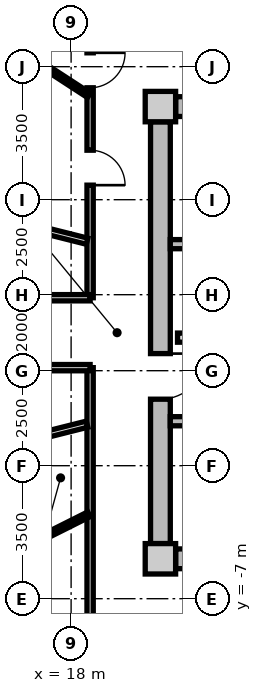
"""IFC4 building model, lengths in metres.
Left out: names, types, materials, properties, quantities, classifications, styles, units other than length and angle.
Written with IfcOpenShell. Run it as: python <this file> out.ifc"""

import sys

from ifc_helpers import new_model, si_unit, direction, frame, frame_2d, origin, origin_2d, place, context, subcontext, project, spatial, rectangle, extrude, source, transform, mapped, element, fill, save


model = new_model("IFC4")
c1 = context("Model", 3, precision=1e-05, world=origin(), true_north=direction((0.0, 1.0)))
c2 = subcontext(c1, "Body", "Model", "MODEL_VIEW")
j1 = project(units=[si_unit("LENGTHUNIT", "METRE"), si_unit("PLANEANGLEUNIT", "RADIAN")], contexts=[c1])
p1 = place(None, origin())
s1 = spatial("IfcSite", under=j1, at=p1, CompositionType="ELEMENT")
p2 = place(p1, origin())
s2 = spatial("IfcBuilding", under=s1, at=p2, CompositionType="ELEMENT")
p3 = place(p2, frame((0.0, 0.0, 203.8)))
s3 = spatial("IfcBuildingStorey", under=s2, at=p3, CompositionType="ELEMENT", Elevation=203.8)
m1 = source(origin(), c2, "Body", "SweptSolid", [
    extrude(rectangle(XDim=0.8, YDim=0.8, at=origin_2d()), origin(), (0.0, 0.0, 1.0), 4.0),
])
for number, where, z_axis, x_axis in (
    (1, (20.35, -5.95, 0.0), (0.0, 0.0, 1.0), (1.0, 0.0, 0.0)),
    (2, (20.35, 5.95, 0.0), (0.0, 0.0, 1.0), (1.0, 0.0, 0.0)),
):
    element("IfcColumn", number, at=place(p3, frame(where, z_axis=z_axis, x_axis=x_axis)), inside=s3, PredefinedType="COLUMN", context=c2, shape_type="MappedRepresentation", body=[
        mapped(m1, transform((0.0, 0.0, 0.0), x_axis=(1.0, 0.0, 0.0), y_axis=(0.0, 1.0, 0.0), z_axis=(0.0, 0.0, 1.0), scale=1.0)),
    ])
m2 = source(origin(), c2, "Body", "SweptSolid", [
    extrude(rectangle(XDim=14.5, YDim=0.52, at=frame_2d((7.25, 0.0))), origin(), (0.0, 0.0, 1.0), 3.71),
])
for number, where, z_axis, x_axis in (
    (3, (20.75, 5.95, 0.0), (0.0, 0.0, 1.0), (1.0, 0.0, 0.0)),
    (4, (35.25, -5.95, 0.0), (0.0, 0.0, 1.0), (-1.0, 0.0, 0.0)),
):
    element("IfcWall", number, at=place(p3, frame(where, z_axis=z_axis, x_axis=x_axis)), inside=s3, PredefinedType="SHEAR", context=c2, shape_type="MappedRepresentation", body=[
        mapped(m2, transform((0.0, 0.0, 0.0), x_axis=(1.0, 0.0, 0.0), y_axis=(0.0, 1.0, 0.0), z_axis=(0.0, 0.0, 1.0), scale=1.0)),
    ])
m3 = source(origin(), c2, "Body", "SweptSolid", [
    extrude(rectangle(XDim=11.1, YDim=0.52, at=frame_2d((5.55, 0.0))), origin(), (0.0, 0.0, 1.0), 3.71),
])
p4 = place(p3, frame((20.35, -5.55, 0.0), z_axis=(0.0, 0.0, 1.0), x_axis=(0.0, 1.0, 0.0)))
e5 = element("IfcWall", 5, at=p4, inside=s3, PredefinedType="SHEAR", context=c2, shape_type="MappedRepresentation", body=[
    mapped(m3, transform((0.0, 0.0, 0.0), x_axis=(1.0, 0.0, 0.0), y_axis=(0.0, 1.0, 0.0), z_axis=(0.0, 0.0, 1.0), scale=1.0)),
])
p5 = place(p4, frame((3.8, 0.0, 0.0)))
e6 = element("IfcOpeningElement", 6, at=p5, cuts=e5, PredefinedType="OPENING", context=c2, shape_type="SweptSolid", body=[
    extrude(rectangle(XDim=1.2, YDim=2.15, at=frame_2d((0.6, 1.075))), frame((0.0, 0.27, 0.0), z_axis=(0.0, -1.0, 0.0), x_axis=(1.0, 0.0, 0.0)), (0.0, 0.0, 1.0), 0.54),
])
m4 = source(origin(), c2, "Body", "SweptSolid", [
    extrude(rectangle(XDim=7.93, YDim=0.24, at=frame_2d((3.965, 0.0))), origin(), (0.0, 0.0, 1.0), 3.71),
])
p6 = place(p3, frame((20.61, 2.33, 0.0), z_axis=(0.0, 0.0, 1.0), x_axis=(1.0, 0.0, 0.0)))
e7 = element("IfcWall", 7, at=p6, inside=s3, PredefinedType="PARTITIONING", context=c2, shape_type="MappedRepresentation", body=[
    mapped(m4, transform((0.0, 0.0, 0.0), x_axis=(1.0, 0.0, 0.0), y_axis=(0.0, 1.0, 0.0), z_axis=(0.0, 0.0, 1.0), scale=1.0)),
])
p7 = place(p3, frame((20.61, -2.33, 0.0), z_axis=(0.0, 0.0, 1.0), x_axis=(1.0, 0.0, 0.0)))
e8 = element("IfcWall", 8, at=p7, inside=s3, PredefinedType="PARTITIONING", context=c2, shape_type="MappedRepresentation", body=[
    mapped(m4, transform((0.0, 0.0, 0.0), x_axis=(1.0, 0.0, 0.0), y_axis=(0.0, 1.0, 0.0), z_axis=(0.0, 0.0, 1.0), scale=1.0)),
])
p8 = place(p7, frame((1.05, 0.0, 0.0)))
e9 = element("IfcOpeningElement", 9, at=p8, cuts=e8, PredefinedType="OPENING", context=c2, shape_type="SweptSolid", body=[
    extrude(rectangle(XDim=1.1, YDim=2.15, at=frame_2d((0.55, 1.075))), frame((0.0, 0.13, 0.0), z_axis=(0.0, -1.0, 0.0), x_axis=(1.0, 0.0, 0.0)), (0.0, 0.0, 1.0), 0.26),
])
m5 = source(origin(), c2, "Body", "SweptSolid", [
    extrude(rectangle(XDim=7.62, YDim=0.24, at=frame_2d((3.81, 0.0))), origin(), (0.0, 0.0, 1.0), 3.695),
])
p9 = place(p3, frame((20.8, -0.13, 0.0), z_axis=(0.0, 0.0, 1.0), x_axis=(1.0, 0.0, 0.0)))
e10 = element("IfcWall", 10, at=p9, inside=s3, PredefinedType="PARTITIONING", context=c2, shape_type="MappedRepresentation", body=[
    mapped(m5, transform((0.0, 0.0, 0.0), x_axis=(1.0, 0.0, 0.0), y_axis=(0.0, 1.0, 0.0), z_axis=(0.0, 0.0, 1.0), scale=1.0)),
])
p10 = place(p9, frame((6.22, 0.0, 0.0)))
e11 = element("IfcOpeningElement", 11, at=p10, cuts=e10, PredefinedType="OPENING", context=c2, shape_type="SweptSolid", body=[
    extrude(rectangle(XDim=1.0, YDim=2.1, at=frame_2d((0.5, 1.05))), frame((0.0, 0.13, 0.0), z_axis=(0.0, -1.0, 0.0), x_axis=(1.0, 0.0, 0.0)), (0.0, 0.0, 1.0), 0.26),
])
p11 = place(p9, frame((2.4, 0.0, 0.0)))
e12 = element("IfcOpeningElement", 12, at=p11, cuts=e10, PredefinedType="OPENING", context=c2, shape_type="SweptSolid", body=[
    extrude(rectangle(XDim=1.0, YDim=2.1, at=frame_2d((0.5, 1.05))), frame((0.0, 0.13, 0.0), z_axis=(0.0, -1.0, 0.0), x_axis=(1.0, 0.0, 0.0)), (0.0, 0.0, 1.0), 0.26),
])
m6 = source(origin(), c2, "Body", "SweptSolid", [
    extrude(rectangle(XDim=6.88, YDim=0.165, at=frame_2d((3.44, 0.0))), origin(), (0.0, 0.0, 1.0), 3.695),
])
p12 = place(p3, frame((18.5, -7.8, 0.0), z_axis=(0.0, 0.0, 1.0), x_axis=(0.0, 1.0, 0.0)))
e13 = element("IfcWall", 13, at=p12, inside=s3, PredefinedType="PARTITIONING", context=c2, shape_type="MappedRepresentation", body=[
    mapped(m6, transform((0.0, 0.0, 0.0), x_axis=(1.0, 0.0, 0.0), y_axis=(0.0, 1.0, 0.0), z_axis=(0.0, 0.0, 1.0), scale=1.0)),
])
p13 = place(p3, frame((18.5, 0.92, 0.0), z_axis=(0.0, 0.0, 1.0), x_axis=(0.0, 1.0, 0.0)))
e14 = element("IfcWall", 14, at=p13, inside=s3, PredefinedType="PARTITIONING", context=c2, shape_type="MappedRepresentation", body=[
    mapped(m6, transform((0.0, 0.0, 0.0), x_axis=(1.0, 0.0, 0.0), y_axis=(0.0, 1.0, 0.0), z_axis=(0.0, 0.0, 1.0), scale=1.0)),
])
p14 = place(p13, frame((5.525, 0.0, 0.0)))
e15 = element("IfcOpeningElement", 15, at=p14, cuts=e14, PredefinedType="OPENING", context=c2, shape_type="SweptSolid", body=[
    extrude(rectangle(XDim=0.92, YDim=2.1, at=frame_2d((0.46, 1.05))), frame((0.0, 0.093, 0.0), z_axis=(0.0, -1.0, 0.0), x_axis=(1.0, 0.0, 0.0)), (0.0, 0.0, 1.0), 0.185),
])
p15 = place(p13, frame((2.962, 0.0, 0.0)))
e16 = element("IfcOpeningElement", 16, at=p15, cuts=e14, PredefinedType="OPENING", context=c2, shape_type="SweptSolid", body=[
    extrude(rectangle(XDim=0.92, YDim=2.1, at=frame_2d((0.46, 1.05))), frame((0.0, 0.093, 0.0), z_axis=(0.0, -1.0, 0.0), x_axis=(1.0, 0.0, 0.0)), (0.0, 0.0, 1.0), 0.185),
])
m7 = source(origin(), c2, "Body", "SweptSolid", [
    extrude(rectangle(XDim=6.157, YDim=0.165, at=frame_2d((3.079, 0.0))), origin(), (0.0, 0.0, 1.0), 3.295),
])
for number, where, z_axis, x_axis in (
    (17, (18.42, 2.407, 0.0), (0.0, 0.0, 1.0), (-0.97, 0.244, 0.0)),
    (18, (18.42, -2.407, 0.0), (0.0, 0.0, 1.0), (-0.97, -0.244, 0.0)),
):
    element("IfcWall", number, at=place(p3, frame(where, z_axis=z_axis, x_axis=x_axis)), inside=s3, PredefinedType="PARTITIONING", context=c2, shape_type="MappedRepresentation", body=[
        mapped(m7, transform((0.0, 0.0, 0.0), x_axis=(1.0, 0.0, 0.0), y_axis=(0.0, 1.0, 0.0), z_axis=(0.0, 0.0, 1.0), scale=1.0)),
    ])
m8 = source(origin(), c2, "Body", "SweptSolid", [
    extrude(rectangle(XDim=3.904, YDim=0.14, at=frame_2d((1.952, 0.0))), origin(), (0.0, 0.0, 1.0), 3.695),
])
p16 = place(p3, frame((18.47, 6.246, 0.0), z_axis=(0.0, 0.0, 1.0), x_axis=(-0.838024687996, 0.545632314209, 0.0)))
e19 = element("IfcWall", 19, at=p16, inside=s3, PredefinedType="PARTITIONING", context=c2, shape_type="MappedRepresentation", body=[
    mapped(m8, transform((0.0, 0.0, 0.0), x_axis=(1.0, 0.0, 0.0), y_axis=(0.0, 1.0, 0.0), z_axis=(0.0, 0.0, 1.0), scale=1.0)),
])
m9 = source(origin(), c2, "Body", "SweptSolid", [
    extrude(rectangle(XDim=1.638, YDim=0.14, at=frame_2d((0.819, 0.0))), origin(), (0.0, 0.0, 1.0), 3.695),
])
p17 = place(p3, frame((18.47, -4.778, 0.0), z_axis=(0.0, 0.0, 1.0), x_axis=(-0.893919977945, -0.448226586707, 0.0)))
e20 = element("IfcWall", 20, at=p17, inside=s3, PredefinedType="PARTITIONING", context=c2, shape_type="MappedRepresentation", body=[
    mapped(m9, transform((0.0, 0.0, 0.0), x_axis=(1.0, 0.0, 0.0), y_axis=(0.0, 1.0, 0.0), z_axis=(0.0, 0.0, 1.0), scale=1.0)),
])
m10 = source(origin(), c2, "Body", "SweptSolid", [
    extrude(rectangle(XDim=3.45, YDim=0.115, at=frame_2d((1.725, 0.0))), origin(), (0.0, 0.0, 1.0), 3.695),
])
p18 = place(p3, frame((16.475, -6.275, 0.0), z_axis=(0.0, 0.0, 1.0), x_axis=(0.483659007882, -0.875256513312, 0.0)))
e21 = element("IfcWall", 21, at=p18, inside=s3, PredefinedType="PARTITIONING", context=c2, shape_type="MappedRepresentation", body=[
    mapped(m10, transform((0.0, 0.0, 0.0), x_axis=(1.0, 0.0, 0.0), y_axis=(0.0, 1.0, 0.0), z_axis=(0.0, 0.0, 1.0), scale=1.0)),
])
p19 = place(p18, frame((1.25, 0.0, 0.0)))
e22 = element("IfcOpeningElement", 22, at=p19, cuts=e21, PredefinedType="OPENING", context=c2, shape_type="SweptSolid", body=[
    extrude(rectangle(XDim=0.95, YDim=2.1, at=frame_2d((0.475, 1.05))), frame((0.0, 0.067, 0.0), z_axis=(0.0, -1.0, 0.0), x_axis=(1.0, 0.0, 0.0)), (0.0, 0.0, 1.0), 0.135),
])
m11 = source(origin(), c2, "Body", "SweptSolid", [
    extrude(rectangle(XDim=37.0, YDim=0.165, at=frame_2d((18.5, 0.0))), origin(), (0.0, 0.0, 1.0), 3.695),
])
p20 = place(p3, frame((-18.5, -0.92, 0.0), z_axis=(0.0, 0.0, 1.0), x_axis=(1.0, 0.0, 0.0)))
e23 = element("IfcWall", 23, at=p20, inside=s3, PredefinedType="PARTITIONING", context=c2, shape_type="MappedRepresentation", body=[
    mapped(m11, transform((0.0, 0.0, 0.0), x_axis=(1.0, 0.0, 0.0), y_axis=(0.0, 1.0, 0.0), z_axis=(0.0, 0.0, 1.0), scale=1.0)),
])
p21 = place(p20, frame((2.662, 0.0, 0.0)))
e24 = element("IfcOpeningElement", 24, at=p21, cuts=e23, PredefinedType="OPENING", context=c2, shape_type="SweptSolid", body=[
    extrude(rectangle(XDim=0.95, YDim=2.1, at=frame_2d((0.475, 1.05))), frame((0.0, 0.093, 0.0), z_axis=(0.0, -1.0, 0.0), x_axis=(1.0, 0.0, 0.0)), (0.0, 0.0, 1.0), 0.185),
])
p22 = place(p20, frame((33.388, 0.0, 0.0)))
e25 = element("IfcOpeningElement", 25, at=p22, cuts=e23, PredefinedType="OPENING", context=c2, shape_type="SweptSolid", body=[
    extrude(rectangle(XDim=0.95, YDim=2.1, at=frame_2d((0.475, 1.05))), frame((0.0, 0.093, 0.0), z_axis=(0.0, -1.0, 0.0), x_axis=(1.0, 0.0, 0.0)), (0.0, 0.0, 1.0), 0.185),
])
p23 = place(p20, frame((9.075, 0.0, 0.0)))
e26 = element("IfcOpeningElement", 26, at=p23, cuts=e23, PredefinedType="OPENING", context=c2, shape_type="SweptSolid", body=[
    extrude(rectangle(XDim=1.25, YDim=2.2, at=frame_2d((0.625, 1.1))), frame((0.0, 0.093, 0.0), z_axis=(0.0, -1.0, 0.0), x_axis=(1.0, 0.0, 0.0)), (0.0, 0.0, 1.0), 0.185),
])
p24 = place(p20, frame((17.875, 0.0, 0.0)))
e27 = element("IfcOpeningElement", 27, at=p24, cuts=e23, PredefinedType="OPENING", context=c2, shape_type="SweptSolid", body=[
    extrude(rectangle(XDim=1.25, YDim=2.2, at=frame_2d((0.625, 1.1))), frame((0.0, 0.093, 0.0), z_axis=(0.0, -1.0, 0.0), x_axis=(1.0, 0.0, 0.0)), (0.0, 0.0, 1.0), 0.185),
])
p25 = place(p20, frame((26.675, 0.0, 0.0)))
e28 = element("IfcOpeningElement", 28, at=p25, cuts=e23, PredefinedType="OPENING", context=c2, shape_type="SweptSolid", body=[
    extrude(rectangle(XDim=1.25, YDim=2.2, at=frame_2d((0.625, 1.1))), frame((0.0, 0.093, 0.0), z_axis=(0.0, -1.0, 0.0), x_axis=(1.0, 0.0, 0.0)), (0.0, 0.0, 1.0), 0.185),
])
p26 = place(p3, frame((-18.5, 0.92, 0.0), z_axis=(0.0, 0.0, 1.0), x_axis=(1.0, 0.0, 0.0)))
e29 = element("IfcWall", 29, at=p26, inside=s3, PredefinedType="PARTITIONING", context=c2, shape_type="MappedRepresentation", body=[
    mapped(m11, transform((0.0, 0.0, 0.0), x_axis=(1.0, 0.0, 0.0), y_axis=(0.0, 1.0, 0.0), z_axis=(0.0, 0.0, 1.0), scale=1.0)),
])
p27 = place(p26, frame((2.662, 0.0, 0.0)))
e30 = element("IfcOpeningElement", 30, at=p27, cuts=e29, PredefinedType="OPENING", context=c2, shape_type="SweptSolid", body=[
    extrude(rectangle(XDim=0.95, YDim=2.1, at=frame_2d((0.475, 1.05))), frame((0.0, 0.093, 0.0), z_axis=(0.0, -1.0, 0.0), x_axis=(1.0, 0.0, 0.0)), (0.0, 0.0, 1.0), 0.185),
])
p28 = place(p26, frame((33.388, 0.0, 0.0)))
e31 = element("IfcOpeningElement", 31, at=p28, cuts=e29, PredefinedType="OPENING", context=c2, shape_type="SweptSolid", body=[
    extrude(rectangle(XDim=0.95, YDim=2.1, at=frame_2d((0.475, 1.05))), frame((0.0, 0.093, 0.0), z_axis=(0.0, -1.0, 0.0), x_axis=(1.0, 0.0, 0.0)), (0.0, 0.0, 1.0), 0.185),
])
p29 = place(p26, frame((7.64, 0.0, 0.0)))
e32 = element("IfcOpeningElement", 32, at=p29, cuts=e29, PredefinedType="OPENING", context=c2, shape_type="SweptSolid", body=[
    extrude(rectangle(XDim=0.92, YDim=2.1, at=frame_2d((0.46, 1.05))), frame((0.0, 0.093, 0.0), z_axis=(0.0, -1.0, 0.0), x_axis=(1.0, 0.0, 0.0)), (0.0, 0.0, 1.0), 0.185),
])
p30 = place(p26, frame((10.275, 0.0, 0.0)))
e33 = element("IfcOpeningElement", 33, at=p30, cuts=e29, PredefinedType="OPENING", context=c2, shape_type="SweptSolid", body=[
    extrude(rectangle(XDim=1.25, YDim=2.2, at=frame_2d((0.625, 1.1))), frame((0.0, 0.093, 0.0), z_axis=(0.0, -1.0, 0.0), x_axis=(1.0, 0.0, 0.0)), (0.0, 0.0, 1.0), 0.185),
])
p31 = place(p26, frame((17.875, 0.0, 0.0)))
e34 = element("IfcOpeningElement", 34, at=p31, cuts=e29, PredefinedType="OPENING", context=c2, shape_type="SweptSolid", body=[
    extrude(rectangle(XDim=1.25, YDim=2.2, at=frame_2d((0.625, 1.1))), frame((0.0, 0.093, 0.0), z_axis=(0.0, -1.0, 0.0), x_axis=(1.0, 0.0, 0.0)), (0.0, 0.0, 1.0), 0.185),
])
p32 = place(p26, frame((26.675, 0.0, 0.0)))
e35 = element("IfcOpeningElement", 35, at=p32, cuts=e29, PredefinedType="OPENING", context=c2, shape_type="SweptSolid", body=[
    extrude(rectangle(XDim=1.25, YDim=2.2, at=frame_2d((0.625, 1.1))), frame((0.0, 0.093, 0.0), z_axis=(0.0, -1.0, 0.0), x_axis=(1.0, 0.0, 0.0)), (0.0, 0.0, 1.0), 0.185),
])
m12 = source(origin(), c2, "Body", "SweptSolid", [
    extrude(rectangle(XDim=1.2, YDim=2.15, at=frame_2d((0.6, 1.075))), frame((0.0, 0.025, 0.0), z_axis=(0.0, -1.0, 0.0), x_axis=(1.0, 0.0, 0.0)), (0.0, 0.0, 1.0), 0.05),
])
p33 = place(p5, frame((1.2, 0.0, 0.0), z_axis=(0.0, 0.0, 1.0), x_axis=(-1.0, 0.0, 0.0)))
e36 = element("IfcDoor", 36, at=p33, inside=s3, OperationType="SINGLE_SWING_LEFT", PredefinedType="DOOR", context=c2, shape_type="MappedRepresentation", body=[
    mapped(m12, transform((0.0, 0.0, 0.0), x_axis=(1.0, 0.0, 0.0), y_axis=(0.0, 1.0, 0.0), z_axis=(0.0, 0.0, 1.0), scale=1.0)),
])
fill(e6, e36)
m13 = source(origin(), c2, "Body", "SweptSolid", [
    extrude(rectangle(XDim=0.92, YDim=2.1, at=frame_2d((0.46, 1.05))), frame((0.0, 0.025, 0.0), z_axis=(0.0, -1.0, 0.0), x_axis=(1.0, 0.0, 0.0)), (0.0, 0.0, 1.0), 0.05),
])
p34 = place(p14, frame((0.92, 0.0, 0.0), z_axis=(0.0, 0.0, 1.0), x_axis=(-1.0, 0.0, 0.0)))
e37 = element("IfcDoor", 37, at=p34, inside=s3, OperationType="SINGLE_SWING_LEFT", PredefinedType="DOOR", context=c2, shape_type="MappedRepresentation", body=[
    mapped(m13, transform((0.0, 0.0, 0.0), x_axis=(1.0, 0.0, 0.0), y_axis=(0.0, 1.0, 0.0), z_axis=(0.0, 0.0, 1.0), scale=1.0)),
])
fill(e15, e37)
p35 = place(p15, frame((0.92, 0.0, 0.0), z_axis=(0.0, 0.0, 1.0), x_axis=(-1.0, 0.0, 0.0)))
e38 = element("IfcDoor", 38, at=p35, inside=s3, OperationType="SINGLE_SWING_RIGHT", PredefinedType="DOOR", context=c2, shape_type="MappedRepresentation", body=[
    mapped(m13, transform((0.0, 0.0, 0.0), x_axis=(1.0, 0.0, 0.0), y_axis=(0.0, 1.0, 0.0), z_axis=(0.0, 0.0, 1.0), scale=1.0)),
])
fill(e16, e38)
m14 = source(origin(), c2, "Body", "SweptSolid", [
    extrude(rectangle(XDim=0.95, YDim=2.1, at=frame_2d((0.475, 1.05))), frame((0.0, 0.025, 0.0), z_axis=(0.0, -1.0, 0.0), x_axis=(1.0, 0.0, 0.0)), (0.0, 0.0, 1.0), 0.05),
])
p36 = place(p19, frame((0.95, 0.0, 0.0), z_axis=(0.0, 0.0, 1.0), x_axis=(-1.0, 0.0, 0.0)))
e39 = element("IfcDoor", 39, at=p36, inside=s3, OperationType="SINGLE_SWING_LEFT", PredefinedType="DOOR", context=c2, shape_type="MappedRepresentation", body=[
    mapped(m14, transform((0.0, 0.0, 0.0), x_axis=(1.0, 0.0, 0.0), y_axis=(0.0, 1.0, 0.0), z_axis=(0.0, 0.0, 1.0), scale=1.0)),
])
fill(e22, e39)
save(model, sys.argv[1])
